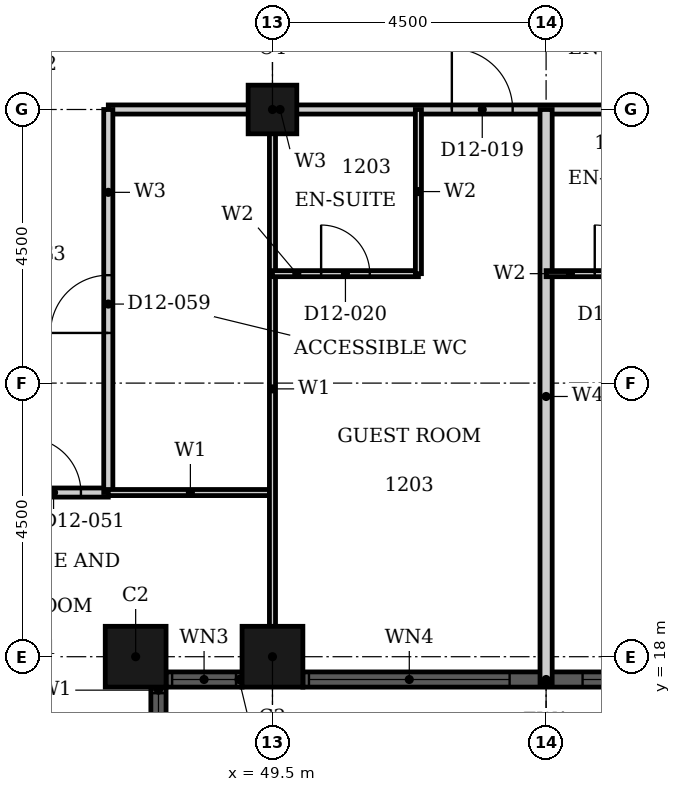
"""IFC4 building model, lengths in metres.
Left out: names, types, materials, properties, quantities, classifications, styles, units other than length and angle.
Written with IfcOpenShell. Run it as: python <this file> out.ifc"""

import sys

from ifc_helpers import new_model, si_unit, direction, frame, frame_2d, origin, origin_2d, place, context, subcontext, project, spatial, rectangle, hollow_rectangle, extrude, element, fill, save


model = new_model("IFC4")
c1 = context("Model", 3, precision=1e-05, world=origin(), true_north=direction((0.0, 1.0)))
c2 = subcontext(c1, "Body", "Model", "MODEL_VIEW")
j1 = project(units=[si_unit("LENGTHUNIT", "METRE"), si_unit("PLANEANGLEUNIT", "RADIAN")], contexts=[c1])
p1 = place(None, origin())
s1 = spatial("IfcSite", under=j1, at=p1, CompositionType="ELEMENT")
p2 = place(p1, origin())
s2 = spatial("IfcBuilding", under=s1, at=p2, CompositionType="ELEMENT")
p3 = place(p2, frame((0.0, 0.0, 56.4)))
s3 = spatial("IfcBuildingStorey", under=s2, at=p3, CompositionType="ELEMENT", Elevation=56.4)
for number, where, z_axis, x_axis in (
    (1, (47.25, 18.0, 0.0), (0.0, 0.0, 1.0), (1.0, 0.0, 0.0)),
    (2, (49.5, 18.0, 0.0), (0.0, 0.0, 1.0), (1.0, 0.0, 0.0)),
):
    element("IfcColumn", number, at=place(p3, frame(where, z_axis=z_axis, x_axis=x_axis)), inside=s3, PredefinedType="COLUMN", context=c2, shape_type="SweptSolid", body=[
        extrude(hollow_rectangle(XDim=1.0, YDim=1.0, WallThickness=0.032, at=origin_2d()), origin(), (0.0, 0.0, 1.0), 3.6),
    ])
p4 = place(p3, frame((49.5, 27.0, 0.0), z_axis=(0.0, 0.0, 1.0), x_axis=(1.0, 0.0, 0.0)))
e3 = element("IfcColumn", 3, at=p4, inside=s3, PredefinedType="COLUMN", context=c2, shape_type="SweptSolid", body=[
    extrude(hollow_rectangle(XDim=0.8, YDim=0.8, WallThickness=0.025, at=origin_2d()), origin(), (0.0, 0.0, 1.0), 3.6),
])
p5 = place(p3, frame((47.625, 16.25, 0.0), z_axis=(0.0, 0.0, 1.0), x_axis=(0.0, 1.0, 0.0)))
e4 = element("IfcWall", 4, at=p5, inside=s3, PredefinedType="SOLIDWALL", context=c2, shape_type="SweptSolid", body=[
    extrude(rectangle(XDim=1.25, YDim=0.25, at=frame_2d((0.625, 0.0))), origin(), (0.0, 0.0, 1.0), 3.6),
])
p6 = place(p5, frame((0.1, 0.0, 0.9)))
e5 = element("IfcOpeningElement", 5, at=p6, cuts=e4, PredefinedType="OPENING", context=c2, shape_type="SweptSolid", body=[
    extrude(rectangle(XDim=1.05, YDim=2.08, at=frame_2d((0.525, 1.04))), frame((0.0, 0.135, 0.0), z_axis=(0.0, -1.0, 0.0), x_axis=(1.0, 0.0, 0.0)), (0.0, 0.0, 1.0), 0.27),
])
p7 = place(p3, frame((47.75, 17.625, 0.0), z_axis=(0.0, 0.0, 1.0), x_axis=(1.0, 0.0, 0.0)))
e6 = element("IfcWall", 6, at=p7, inside=s3, PredefinedType="SOLIDWALL", context=c2, shape_type="SweptSolid", body=[
    extrude(rectangle(XDim=1.25, YDim=0.25, at=frame_2d((0.625, 0.0))), origin(), (0.0, 0.0, 1.0), 3.6),
])
p8 = place(p7, frame((0.1, 0.0, 0.9)))
e7 = element("IfcOpeningElement", 7, at=p8, cuts=e6, PredefinedType="OPENING", context=c2, shape_type="SweptSolid", body=[
    extrude(rectangle(XDim=1.05, YDim=2.08, at=frame_2d((0.525, 1.04))), frame((0.0, 0.135, 0.0), z_axis=(0.0, -1.0, 0.0), x_axis=(1.0, 0.0, 0.0)), (0.0, 0.0, 1.0), 0.27),
])
p9 = place(p3, frame((50.0, 17.625, 0.0), z_axis=(0.0, 0.0, 1.0), x_axis=(1.0, 0.0, 0.0)))
e8 = element("IfcWall", 8, at=p9, inside=s3, PredefinedType="SOLIDWALL", context=c2, shape_type="SweptSolid", body=[
    extrude(rectangle(XDim=8.0, YDim=0.25, at=frame_2d((4.0, 0.0))), origin(), (0.0, 0.0, 1.0), 3.6),
])
p10 = place(p9, frame((0.1, 0.0, 0.9)))
e9 = element("IfcOpeningElement", 9, at=p10, cuts=e8, PredefinedType="OPENING", context=c2, shape_type="SweptSolid", body=[
    extrude(rectangle(XDim=3.3, YDim=2.08, at=frame_2d((1.65, 1.04))), frame((0.0, 0.135, 0.0), z_axis=(0.0, -1.0, 0.0), x_axis=(1.0, 0.0, 0.0)), (0.0, 0.0, 1.0), 0.27),
])
p11 = place(p9, frame((4.6, 0.0, 0.9)))
e10 = element("IfcOpeningElement", 10, at=p11, cuts=e8, PredefinedType="OPENING", context=c2, shape_type="SweptSolid", body=[
    extrude(rectangle(XDim=3.3, YDim=2.08, at=frame_2d((1.65, 1.04))), frame((0.0, 0.135, 0.0), z_axis=(0.0, -1.0, 0.0), x_axis=(1.0, 0.0, 0.0)), (0.0, 0.0, 1.0), 0.27),
])
p12 = place(p3, frame((31.5, 20.7, 0.0), z_axis=(0.0, 0.0, 1.0), x_axis=(1.0, 0.0, 0.0)))
e11 = element("IfcWall", 11, at=p12, inside=s3, PredefinedType="PARTITIONING", context=c2, shape_type="SweptSolid", body=[
    extrude(rectangle(XDim=15.3, YDim=0.15, at=frame_2d((7.65, 0.0))), origin(), (0.0, 0.0, 1.0), 3.3),
])
p13 = place(p12, frame((11.95, 0.0, 0.0)))
e12 = element("IfcOpeningElement", 12, at=p13, cuts=e11, PredefinedType="OPENING", context=c2, shape_type="SweptSolid", body=[
    extrude(rectangle(XDim=1.0, YDim=2.1, at=frame_2d((0.5, 1.05))), frame((0.0, 0.085, 0.0), z_axis=(0.0, -1.0, 0.0), x_axis=(1.0, 0.0, 0.0)), (0.0, 0.0, 1.0), 0.17),
])
p14 = place(p12, frame((13.95, 0.0, 0.0)))
e13 = element("IfcOpeningElement", 13, at=p14, cuts=e11, PredefinedType="OPENING", context=c2, shape_type="SweptSolid", body=[
    extrude(rectangle(XDim=0.9, YDim=2.1, at=frame_2d((0.45, 1.05))), frame((0.0, 0.085, 0.0), z_axis=(0.0, -1.0, 0.0), x_axis=(1.0, 0.0, 0.0)), (0.0, 0.0, 1.0), 0.17),
])
p15 = place(p12, frame((1.05, 0.0, 0.0)))
e14 = element("IfcOpeningElement", 14, at=p15, cuts=e11, PredefinedType="OPENING", context=c2, shape_type="SweptSolid", body=[
    extrude(rectangle(XDim=0.9, YDim=2.1, at=frame_2d((0.45, 1.05))), frame((0.0, 0.085, 0.0), z_axis=(0.0, -1.0, 0.0), x_axis=(1.0, 0.0, 0.0)), (0.0, 0.0, 1.0), 0.17),
])
p16 = place(p12, frame((5.55, 0.0, 0.0)))
e15 = element("IfcOpeningElement", 15, at=p16, cuts=e11, PredefinedType="OPENING", context=c2, shape_type="SweptSolid", body=[
    extrude(rectangle(XDim=0.9, YDim=2.1, at=frame_2d((0.45, 1.05))), frame((0.0, 0.085, 0.0), z_axis=(0.0, -1.0, 0.0), x_axis=(1.0, 0.0, 0.0)), (0.0, 0.0, 1.0), 0.17),
])
p17 = place(p3, frame((46.8, 27.0, 0.0), z_axis=(0.0, 0.0, 1.0), x_axis=(1.0, 0.0, 0.0)))
e16 = element("IfcWall", 16, at=p17, inside=s3, PredefinedType="PARTITIONING", context=c2, shape_type="SweptSolid", body=[
    extrude(rectangle(XDim=11.7, YDim=0.15, at=frame_2d((5.85, 0.0))), origin(), (0.0, 0.0, 1.0), 2.58),
])
p18 = place(p17, frame((5.65, 0.0, 0.0)))
e17 = element("IfcOpeningElement", 17, at=p18, cuts=e16, PredefinedType="OPENING", context=c2, shape_type="SweptSolid", body=[
    extrude(rectangle(XDim=1.0, YDim=2.1, at=frame_2d((0.5, 1.05))), frame((0.0, 0.085, 0.0), z_axis=(0.0, -1.0, 0.0), x_axis=(1.0, 0.0, 0.0)), (0.0, 0.0, 1.0), 0.17),
])
p19 = place(p17, frame((10.15, 0.0, 0.0)))
e18 = element("IfcOpeningElement", 18, at=p19, cuts=e16, PredefinedType="OPENING", context=c2, shape_type="SweptSolid", body=[
    extrude(rectangle(XDim=1.0, YDim=2.1, at=frame_2d((0.5, 1.05))), frame((0.0, 0.085, 0.0), z_axis=(0.0, -1.0, 0.0), x_axis=(1.0, 0.0, 0.0)), (0.0, 0.0, 1.0), 0.17),
])
p20 = place(p3, frame((46.8, 20.7, 0.0), z_axis=(0.0, 0.0, 1.0), x_axis=(0.0, 1.0, 0.0)))
e19 = element("IfcWall", 19, at=p20, inside=s3, PredefinedType="PARTITIONING", context=c2, shape_type="SweptSolid", body=[
    extrude(rectangle(XDim=6.3, YDim=0.15, at=frame_2d((3.15, 0.0))), origin(), (0.0, 0.0, 1.0), 3.3),
])
p21 = place(p20, frame((2.625, 0.0, 0.0)))
e20 = element("IfcOpeningElement", 20, at=p21, cuts=e19, PredefinedType="OPENING", context=c2, shape_type="SweptSolid", body=[
    extrude(rectangle(XDim=0.95, YDim=2.1, at=frame_2d((0.475, 1.05))), frame((0.0, 0.085, 0.0), z_axis=(0.0, -1.0, 0.0), x_axis=(1.0, 0.0, 0.0)), (0.0, 0.0, 1.0), 0.17),
])
p22 = place(p3, frame((46.8, 20.7, 0.0), z_axis=(0.0, 0.0, 1.0), x_axis=(1.0, 0.0, 0.0)))
e21 = element("IfcWall", 21, at=p22, inside=s3, PredefinedType="PARTITIONING", context=c2, shape_type="SweptSolid", body=[
    extrude(rectangle(XDim=2.7, YDim=0.1, at=frame_2d((1.35, 0.0))), origin(), (0.0, 0.0, 1.0), 3.3),
])
p23 = place(p3, frame((49.5, 17.81, 0.0), z_axis=(0.0, 0.0, 1.0), x_axis=(0.0, 1.0, 0.0)))
e22 = element("IfcWall", 22, at=p23, inside=s3, PredefinedType="PARTITIONING", context=c2, shape_type="SweptSolid", body=[
    extrude(rectangle(XDim=9.19, YDim=0.1, at=frame_2d((4.595, 0.0))), origin(), (0.0, 0.0, 1.0), 2.38),
])
p24 = place(p3, frame((54.0, 17.56, 0.0), z_axis=(0.0, 0.0, 1.0), x_axis=(0.0, 1.0, 0.0)))
e23 = element("IfcWall", 23, at=p24, inside=s3, PredefinedType="PARTITIONING", context=c2, shape_type="SweptSolid", body=[
    extrude(rectangle(XDim=9.44, YDim=0.2, at=frame_2d((4.72, 0.0))), origin(), (0.0, 0.0, 1.0), 3.3),
])
p25 = place(p3, frame((49.5, 24.3, 0.0), z_axis=(0.0, 0.0, 1.0), x_axis=(1.0, 0.0, 0.0)))
e24 = element("IfcWall", 24, at=p25, inside=s3, PredefinedType="PARTITIONING", context=c2, shape_type="SweptSolid", body=[
    extrude(rectangle(XDim=2.4, YDim=0.1, at=frame_2d((1.2, 0.0))), origin(), (0.0, 0.0, 1.0), 3.3),
])
p26 = place(p25, frame((0.8, 0.0, 0.0)))
e25 = element("IfcOpeningElement", 25, at=p26, cuts=e24, PredefinedType="OPENING", context=c2, shape_type="SweptSolid", body=[
    extrude(rectangle(XDim=0.8, YDim=2.1, at=frame_2d((0.4, 1.05))), frame((0.0, 0.06, 0.0), z_axis=(0.0, -1.0, 0.0), x_axis=(1.0, 0.0, 0.0)), (0.0, 0.0, 1.0), 0.12),
])
p27 = place(p3, frame((54.0, 24.3, 0.0), z_axis=(0.0, 0.0, 1.0), x_axis=(1.0, 0.0, 0.0)))
e26 = element("IfcWall", 26, at=p27, inside=s3, PredefinedType="PARTITIONING", context=c2, shape_type="SweptSolid", body=[
    extrude(rectangle(XDim=2.4, YDim=0.1, at=frame_2d((1.2, 0.0))), origin(), (0.0, 0.0, 1.0), 3.3),
])
p28 = place(p27, frame((0.8, 0.0, 0.0)))
e27 = element("IfcOpeningElement", 27, at=p28, cuts=e26, PredefinedType="OPENING", context=c2, shape_type="SweptSolid", body=[
    extrude(rectangle(XDim=0.8, YDim=2.1, at=frame_2d((0.4, 1.05))), frame((0.0, 0.06, 0.0), z_axis=(0.0, -1.0, 0.0), x_axis=(1.0, 0.0, 0.0)), (0.0, 0.0, 1.0), 0.12),
])
p29 = place(p3, frame((51.9, 24.3, 0.0), z_axis=(0.0, 0.0, 1.0), x_axis=(0.0, 1.0, 0.0)))
e28 = element("IfcWall", 28, at=p29, inside=s3, PredefinedType="PARTITIONING", context=c2, shape_type="SweptSolid", body=[
    extrude(rectangle(XDim=2.7, YDim=0.1, at=frame_2d((1.35, 0.0))), origin(), (0.0, 0.0, 1.0), 3.3),
])
p30 = place(p6, origin())
e29 = element("IfcWindow", 29, at=p30, inside=s3, PartitioningType="SINGLE_PANEL", PredefinedType="WINDOW", context=c2, shape_type="SweptSolid", body=[
    extrude(rectangle(XDim=1.05, YDim=2.08, at=frame_2d((0.525, 1.04))), frame((0.0, 0.03, 0.0), z_axis=(0.0, -1.0, 0.0), x_axis=(1.0, 0.0, 0.0)), (0.0, 0.0, 1.0), 0.06),
])
fill(e5, e29)
p31 = place(p8, origin())
e30 = element("IfcWindow", 30, at=p31, inside=s3, PartitioningType="SINGLE_PANEL", PredefinedType="WINDOW", context=c2, shape_type="SweptSolid", body=[
    extrude(rectangle(XDim=1.05, YDim=2.08, at=frame_2d((0.525, 1.04))), frame((0.0, 0.03, 0.0), z_axis=(0.0, -1.0, 0.0), x_axis=(1.0, 0.0, 0.0)), (0.0, 0.0, 1.0), 0.06),
])
fill(e7, e30)
p32 = place(p10, origin())
e31 = element("IfcWindow", 31, at=p32, inside=s3, PartitioningType="SINGLE_PANEL", PredefinedType="WINDOW", context=c2, shape_type="SweptSolid", body=[
    extrude(rectangle(XDim=3.3, YDim=2.08, at=frame_2d((1.65, 1.04))), frame((0.0, 0.03, 0.0), z_axis=(0.0, -1.0, 0.0), x_axis=(1.0, 0.0, 0.0)), (0.0, 0.0, 1.0), 0.06),
])
fill(e9, e31)
p33 = place(p11, origin())
e32 = element("IfcWindow", 32, at=p33, inside=s3, PartitioningType="SINGLE_PANEL", PredefinedType="WINDOW", context=c2, shape_type="SweptSolid", body=[
    extrude(rectangle(XDim=3.3, YDim=2.08, at=frame_2d((1.65, 1.04))), frame((0.0, 0.03, 0.0), z_axis=(0.0, -1.0, 0.0), x_axis=(1.0, 0.0, 0.0)), (0.0, 0.0, 1.0), 0.06),
])
fill(e10, e32)
p34 = place(p18, origin())
e33 = element("IfcDoor", 33, at=p34, inside=s3, OperationType="SINGLE_SWING_RIGHT", PredefinedType="DOOR", context=c2, shape_type="SweptSolid", body=[
    extrude(rectangle(XDim=1.0, YDim=2.1, at=frame_2d((0.5, 1.05))), frame((0.0, 0.025, 0.0), z_axis=(0.0, -1.0, 0.0), x_axis=(1.0, 0.0, 0.0)), (0.0, 0.0, 1.0), 0.05),
])
fill(e17, e33)
p35 = place(p26, origin())
e34 = element("IfcDoor", 34, at=p35, inside=s3, OperationType="SINGLE_SWING_LEFT", PredefinedType="DOOR", context=c2, shape_type="SweptSolid", body=[
    extrude(rectangle(XDim=0.8, YDim=2.1, at=frame_2d((0.4, 1.05))), frame((0.0, 0.025, 0.0), z_axis=(0.0, -1.0, 0.0), x_axis=(1.0, 0.0, 0.0)), (0.0, 0.0, 1.0), 0.05),
])
fill(e25, e34)
p36 = place(p28, origin())
e35 = element("IfcDoor", 35, at=p36, inside=s3, OperationType="SINGLE_SWING_RIGHT", PredefinedType="DOOR", context=c2, shape_type="SweptSolid", body=[
    extrude(rectangle(XDim=0.8, YDim=2.1, at=frame_2d((0.4, 1.05))), frame((0.0, 0.025, 0.0), z_axis=(0.0, -1.0, 0.0), x_axis=(1.0, 0.0, 0.0)), (0.0, 0.0, 1.0), 0.05),
])
fill(e27, e35)
p37 = place(p14, origin())
e36 = element("IfcDoor", 36, at=p37, inside=s3, OperationType="SINGLE_SWING_LEFT", PredefinedType="DOOR", context=c2, shape_type="SweptSolid", body=[
    extrude(rectangle(XDim=0.9, YDim=2.1, at=frame_2d((0.45, 1.05))), frame((0.0, 0.025, 0.0), z_axis=(0.0, -1.0, 0.0), x_axis=(1.0, 0.0, 0.0)), (0.0, 0.0, 1.0), 0.05),
])
fill(e13, e36)
p38 = place(p21, origin())
e37 = element("IfcDoor", 37, at=p38, inside=s3, OperationType="SINGLE_SWING_LEFT", PredefinedType="DOOR", context=c2, shape_type="SweptSolid", body=[
    extrude(rectangle(XDim=0.95, YDim=2.1, at=frame_2d((0.475, 1.05))), frame((0.0, 0.025, 0.0), z_axis=(0.0, -1.0, 0.0), x_axis=(1.0, 0.0, 0.0)), (0.0, 0.0, 1.0), 0.05),
])
fill(e20, e37)
save(model, sys.argv[1])
